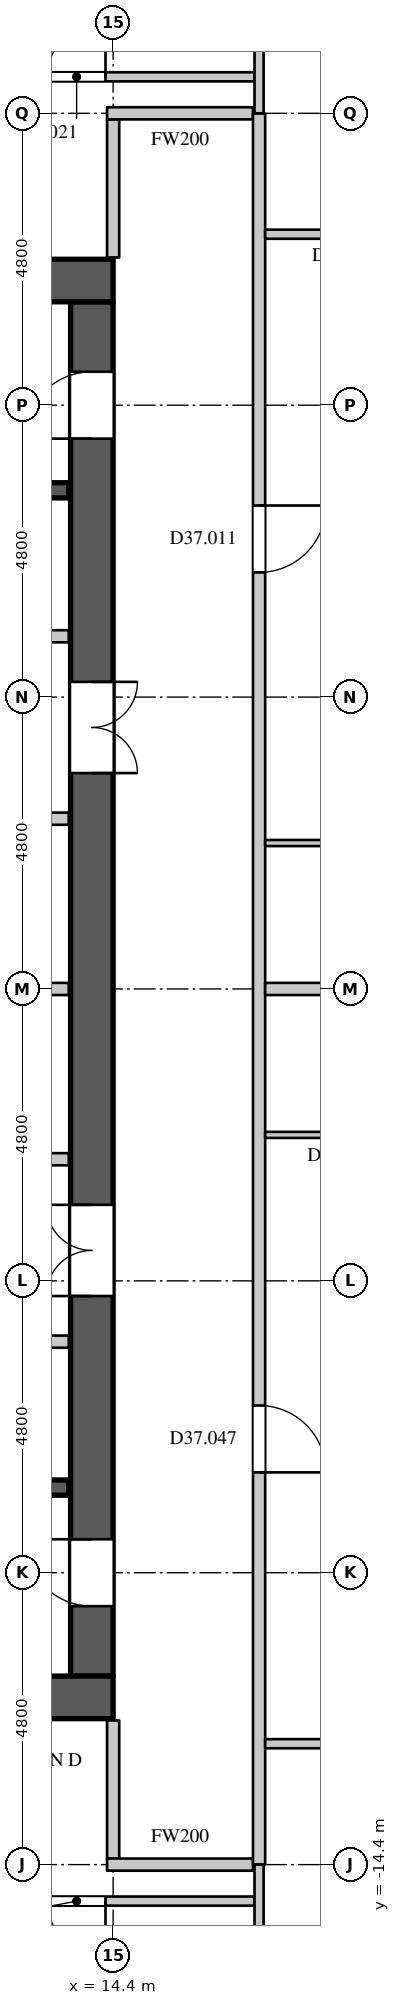
"""IFC4 building model, lengths in metres.
Left out: names, types, materials, properties, quantities, classifications, styles, units other than length and angle.
Written with IfcOpenShell. Run it as: python <this file> out.ifc"""

import sys

from ifc_helpers import new_model, si_unit, direction, frame, frame_2d, origin, place, context, subcontext, project, spatial, rectangle, extrude, element, fill, save


model = new_model("IFC4")
c1 = context("Model", 3, precision=1e-05, world=origin(), true_north=direction((0.0, 1.0)))
c2 = subcontext(c1, "Body", "Model", "MODEL_VIEW")
j1 = project(units=[si_unit("LENGTHUNIT", "METRE"), si_unit("PLANEANGLEUNIT", "RADIAN")], contexts=[c1])
p1 = place(None, origin())
s1 = spatial("IfcSite", under=j1, at=p1, CompositionType="ELEMENT")
p2 = place(p1, origin())
s2 = spatial("IfcBuilding", under=s1, at=p2, CompositionType="ELEMENT")
p3 = place(p2, frame((0.0, 0.0, 162.3)))
s3 = spatial("IfcBuildingStorey", under=s2, at=p3, CompositionType="ELEMENT", Elevation=162.3)
for number, where, z_axis, x_axis in (
    (1, (-14.4, 11.65, 0.0), (0.0, 0.0, 1.0), (1.0, 0.0, 0.0)),
    (2, (-14.4, -11.65, 0.0), (0.0, 0.0, 1.0), (1.0, 0.0, 0.0)),
):
    element("IfcWall", number, at=place(p3, frame(where, z_axis=z_axis, x_axis=x_axis)), inside=s3, PredefinedType="SHEAR", context=c2, shape_type="SweptSolid", body=[
        extrude(rectangle(XDim=28.8, YDim=0.7, at=frame_2d((14.4, 0.0))), origin(), (0.0, 0.0, 1.0), 4.2),
    ])
p4 = place(p3, frame((14.05, -11.3, 0.0), z_axis=(0.0, 0.0, 1.0), x_axis=(0.0, 1.0, 0.0)))
e3 = element("IfcWall", 3, at=p4, inside=s3, PredefinedType="SHEAR", context=c2, shape_type="SweptSolid", body=[
    extrude(rectangle(XDim=22.6, YDim=0.7, at=frame_2d((11.3, 0.0))), origin(), (0.0, 0.0, 1.0), 4.2),
])
p5 = place(p4, frame((20.35, 0.0, 0.0)))
e4 = element("IfcOpeningElement", 4, at=p5, cuts=e3, PredefinedType="OPENING", context=c2, shape_type="SweptSolid", body=[
    extrude(rectangle(XDim=1.1, YDim=2.2, at=frame_2d((0.55, 1.1))), frame((0.0, 0.36, 0.0), z_axis=(0.0, -1.0, 0.0), x_axis=(1.0, 0.0, 0.0)), (0.0, 0.0, 1.0), 0.72),
])
p6 = place(p4, frame((1.15, 0.0, 0.0)))
e5 = element("IfcOpeningElement", 5, at=p6, cuts=e3, PredefinedType="OPENING", context=c2, shape_type="SweptSolid", body=[
    extrude(rectangle(XDim=1.1, YDim=2.2, at=frame_2d((0.55, 1.1))), frame((0.0, 0.36, 0.0), z_axis=(0.0, -1.0, 0.0), x_axis=(1.0, 0.0, 0.0)), (0.0, 0.0, 1.0), 0.72),
])
p7 = place(p4, frame((14.85, 0.0, 0.0)))
e6 = element("IfcOpeningElement", 6, at=p7, cuts=e3, PredefinedType="OPENING", context=c2, shape_type="SweptSolid", body=[
    extrude(rectangle(XDim=1.5, YDim=2.4, at=frame_2d((0.75, 1.2))), frame((0.0, 0.36, 0.0), z_axis=(0.0, -1.0, 0.0), x_axis=(1.0, 0.0, 0.0)), (0.0, 0.0, 1.0), 0.72),
])
p8 = place(p4, frame((6.25, 0.0, 0.0)))
e7 = element("IfcOpeningElement", 7, at=p8, cuts=e3, PredefinedType="OPENING", context=c2, shape_type="SweptSolid", body=[
    extrude(rectangle(XDim=1.5, YDim=2.4, at=frame_2d((0.75, 1.2))), frame((0.0, 0.36, 0.0), z_axis=(0.0, -1.0, 0.0), x_axis=(1.0, 0.0, 0.0)), (0.0, 0.0, 1.0), 0.72),
])
p9 = place(p3, frame((-2.22, -5.8, 0.0), z_axis=(0.0, 0.0, 1.0), x_axis=(1.0, 0.0, 0.0)))
e8 = element("IfcWall", 8, at=p9, inside=s3, PredefinedType="PARTITIONING", context=c2, shape_type="SweptSolid", body=[
    extrude(rectangle(XDim=15.89, YDim=0.2, at=frame_2d((7.945, 0.0))), origin(), (0.0, 0.0, 1.0), 3.95),
])
p10 = place(p9, frame((3.15, 0.0, 0.0)))
e9 = element("IfcOpeningElement", 9, at=p10, cuts=e8, PredefinedType="OPENING", context=c2, shape_type="SweptSolid", body=[
    extrude(rectangle(XDim=0.9, YDim=2.2, at=frame_2d((0.45, 1.1))), frame((0.0, 0.11, 0.0), z_axis=(0.0, -1.0, 0.0), x_axis=(1.0, 0.0, 0.0)), (0.0, 0.0, 1.0), 0.22),
])
p11 = place(p9, frame((8.5, 0.0, 0.0)))
e10 = element("IfcOpeningElement", 10, at=p11, cuts=e8, PredefinedType="OPENING", context=c2, shape_type="SweptSolid", body=[
    extrude(rectangle(XDim=0.9, YDim=2.2, at=frame_2d((0.45, 1.1))), frame((0.0, 0.11, 0.0), z_axis=(0.0, -1.0, 0.0), x_axis=(1.0, 0.0, 0.0)), (0.0, 0.0, 1.0), 0.22),
])
p12 = place(p9, frame((12.8, 0.0, 0.0)))
e11 = element("IfcOpeningElement", 11, at=p12, cuts=e8, PredefinedType="OPENING", context=c2, shape_type="SweptSolid", body=[
    extrude(rectangle(XDim=0.9, YDim=2.2, at=frame_2d((0.45, 1.1))), frame((0.0, 0.11, 0.0), z_axis=(0.0, -1.0, 0.0), x_axis=(1.0, 0.0, 0.0)), (0.0, 0.0, 1.0), 0.22),
])
p13 = place(p3, frame((14.4, -14.3, 0.0), z_axis=(0.0, 0.0, 1.0), x_axis=(0.0, 1.0, 0.0)))
e12 = element("IfcWall", 12, at=p13, inside=s3, PredefinedType="PARTITIONING", context=c2, shape_type="SweptSolid", body=[
    extrude(rectangle(XDim=2.27, YDim=0.2, at=frame_2d((1.135, 0.0))), origin(), (0.0, 0.0, 1.0), 3.95),
])
p14 = place(p3, frame((14.3, -14.4, 0.0), z_axis=(0.0, 0.0, 1.0), x_axis=(1.0, 0.0, 0.0)))
e13 = element("IfcWall", 13, at=p14, inside=s3, PredefinedType="PARTITIONING", context=c2, shape_type="SweptSolid", body=[
    extrude(rectangle(XDim=2.4, YDim=0.2, at=frame_2d((1.2, 0.0))), origin(), (0.0, 0.0, 1.0), 3.95),
])
p15 = place(p3, frame((14.4, 12.03, 0.0), z_axis=(0.0, 0.0, 1.0), x_axis=(0.0, 1.0, 0.0)))
e14 = element("IfcWall", 14, at=p15, inside=s3, PredefinedType="PARTITIONING", context=c2, shape_type="SweptSolid", body=[
    extrude(rectangle(XDim=2.27, YDim=0.2, at=frame_2d((1.135, 0.0))), origin(), (0.0, 0.0, 1.0), 3.95),
])
p16 = place(p3, frame((14.3, 14.4, 0.0), z_axis=(0.0, 0.0, 1.0), x_axis=(1.0, 0.0, 0.0)))
e15 = element("IfcWall", 15, at=p16, inside=s3, PredefinedType="PARTITIONING", context=c2, shape_type="SweptSolid", body=[
    extrude(rectangle(XDim=2.4, YDim=0.2, at=frame_2d((1.2, 0.0))), origin(), (0.0, 0.0, 1.0), 3.95),
])
p17 = place(p3, frame((16.8, -14.4, 0.0), z_axis=(0.0, 0.0, 1.0), x_axis=(0.0, 1.0, 0.0)))
e16 = element("IfcWall", 16, at=p17, inside=s3, PredefinedType="PARTITIONING", context=c2, shape_type="SweptSolid", body=[
    extrude(rectangle(XDim=28.8, YDim=0.2, at=frame_2d((14.4, 0.0))), origin(), (0.0, 0.0, 1.0), 3.95),
])
p18 = place(p17, frame((21.25, 0.0, 0.0)))
e17 = element("IfcOpeningElement", 17, at=p18, cuts=e16, PredefinedType="OPENING", context=c2, shape_type="SweptSolid", body=[
    extrude(rectangle(XDim=1.1, YDim=2.4, at=frame_2d((0.55, 1.2))), frame((0.0, 0.11, 0.0), z_axis=(0.0, -1.0, 0.0), x_axis=(1.0, 0.0, 0.0)), (0.0, 0.0, 1.0), 0.22),
])
p19 = place(p17, frame((6.45, 0.0, 0.0)))
e18 = element("IfcOpeningElement", 18, at=p19, cuts=e16, PredefinedType="OPENING", context=c2, shape_type="SweptSolid", body=[
    extrude(rectangle(XDim=1.1, YDim=2.4, at=frame_2d((0.55, 1.2))), frame((0.0, 0.11, 0.0), z_axis=(0.0, -1.0, 0.0), x_axis=(1.0, 0.0, 0.0)), (0.0, 0.0, 1.0), 0.22),
])
p20 = place(p3, frame((11.675, -15.0, 0.0), z_axis=(0.0, 0.0, 1.0), x_axis=(1.0, 0.0, 0.0)))
e19 = element("IfcWall", 19, at=p20, inside=s3, PredefinedType="PARTITIONING", context=c2, shape_type="SweptSolid", body=[
    extrude(rectangle(XDim=5.051, YDim=0.15, at=frame_2d((2.525, 0.0))), origin(), (0.0, 0.0, 1.0), 3.95),
])
p21 = place(p20, frame((1.65, 0.0, 0.0)))
e20 = element("IfcOpeningElement", 20, at=p21, cuts=e19, PredefinedType="OPENING", context=c2, shape_type="SweptSolid", body=[
    extrude(rectangle(XDim=0.95, YDim=2.2, at=frame_2d((0.475, 1.1))), frame((0.0, 0.085, 0.0), z_axis=(0.0, -1.0, 0.0), x_axis=(1.0, 0.0, 0.0)), (0.0, 0.0, 1.0), 0.17),
])
p22 = place(p3, frame((11.675, 15.0, 0.0), z_axis=(0.0, 0.0, 1.0), x_axis=(1.0, 0.0, 0.0)))
e21 = element("IfcWall", 21, at=p22, inside=s3, PredefinedType="PARTITIONING", context=c2, shape_type="SweptSolid", body=[
    extrude(rectangle(XDim=5.051, YDim=0.15, at=frame_2d((2.525, 0.0))), origin(), (0.0, 0.0, 1.0), 3.95),
])
p23 = place(p22, frame((1.65, 0.0, 0.0)))
e22 = element("IfcOpeningElement", 22, at=p23, cuts=e21, PredefinedType="OPENING", context=c2, shape_type="SweptSolid", body=[
    extrude(rectangle(XDim=0.95, YDim=2.2, at=frame_2d((0.475, 1.1))), frame((0.0, 0.085, 0.0), z_axis=(0.0, -1.0, 0.0), x_axis=(1.0, 0.0, 0.0)), (0.0, 0.0, 1.0), 0.17),
])
p24 = place(p3, frame((16.8, -18.131, 0.0), z_axis=(0.0, 0.0, 1.0), x_axis=(0.0, 1.0, 0.0)))
e23 = element("IfcWall", 23, at=p24, inside=s3, PredefinedType="PARTITIONING", context=c2, shape_type="SweptSolid", body=[
    extrude(rectangle(XDim=3.731, YDim=0.15, at=frame_2d((1.865, 0.0))), origin(), (0.0, 0.0, 1.0), 3.95),
])
p25 = place(p24, frame((1.15, 0.0, 0.0)))
e24 = element("IfcOpeningElement", 24, at=p25, cuts=e23, PredefinedType="OPENING", context=c2, shape_type="SweptSolid", body=[
    extrude(rectangle(XDim=0.95, YDim=2.2, at=frame_2d((0.475, 1.1))), frame((0.0, 0.085, 0.0), z_axis=(0.0, -1.0, 0.0), x_axis=(1.0, 0.0, 0.0)), (0.0, 0.0, 1.0), 0.17),
])
p26 = place(p3, frame((16.9, -12.412, 0.0), z_axis=(0.0, 0.0, 1.0), x_axis=(1.0, 0.0, 0.0)))
e25 = element("IfcWall", 25, at=p26, inside=s3, PredefinedType="PARTITIONING", context=c2, shape_type="SweptSolid", body=[
    extrude(rectangle(XDim=5.638, YDim=0.15, at=frame_2d((2.819, 0.0))), origin(), (0.0, 0.0, 1.0), 3.95),
])
p27 = place(p26, frame((1.2, 0.0, 0.0)))
e26 = element("IfcOpeningElement", 26, at=p27, cuts=e25, PredefinedType="OPENING", context=c2, shape_type="SweptSolid", body=[
    extrude(rectangle(XDim=0.95, YDim=2.2, at=frame_2d((0.475, 1.1))), frame((0.0, 0.085, 0.0), z_axis=(0.0, -1.0, 0.0), x_axis=(1.0, 0.0, 0.0)), (0.0, 0.0, 1.0), 0.17),
])
p28 = place(p3, frame((16.9, 12.412, 0.0), z_axis=(0.0, 0.0, 1.0), x_axis=(1.0, 0.0, 0.0)))
e27 = element("IfcWall", 27, at=p28, inside=s3, PredefinedType="PARTITIONING", context=c2, shape_type="SweptSolid", body=[
    extrude(rectangle(XDim=5.638, YDim=0.15, at=frame_2d((2.819, 0.0))), origin(), (0.0, 0.0, 1.0), 3.95),
])
p29 = place(p28, frame((1.2, 0.0, 0.0)))
e28 = element("IfcOpeningElement", 28, at=p29, cuts=e27, PredefinedType="OPENING", context=c2, shape_type="SweptSolid", body=[
    extrude(rectangle(XDim=0.95, YDim=2.2, at=frame_2d((0.475, 1.1))), frame((0.0, 0.085, 0.0), z_axis=(0.0, -1.0, 0.0), x_axis=(1.0, 0.0, 0.0)), (0.0, 0.0, 1.0), 0.17),
])
p30 = place(p3, frame((16.8, 14.4, 0.0), z_axis=(0.0, 0.0, 1.0), x_axis=(0.0, 1.0, 0.0)))
e29 = element("IfcWall", 29, at=p30, inside=s3, PredefinedType="PARTITIONING", context=c2, shape_type="SweptSolid", body=[
    extrude(rectangle(XDim=3.731, YDim=0.15, at=frame_2d((1.865, 0.0))), origin(), (0.0, 0.0, 1.0), 3.95),
])
p31 = place(p30, frame((1.6, 0.0, 0.0)))
e30 = element("IfcOpeningElement", 30, at=p31, cuts=e29, PredefinedType="OPENING", context=c2, shape_type="SweptSolid", body=[
    extrude(rectangle(XDim=0.95, YDim=2.2, at=frame_2d((0.475, 1.1))), frame((0.0, 0.085, 0.0), z_axis=(0.0, -1.0, 0.0), x_axis=(1.0, 0.0, 0.0)), (0.0, 0.0, 1.0), 0.17),
])
p32 = place(p3, frame((16.9, 0.0, 0.0), z_axis=(0.0, 0.0, 1.0), x_axis=(1.0, 0.0, 0.0)))
e31 = element("IfcWall", 31, at=p32, inside=s3, PredefinedType="PARTITIONING", context=c2, shape_type="SweptSolid", body=[
    extrude(rectangle(XDim=7.155, YDim=0.2, at=frame_2d((3.578, 0.0))), origin(), (0.0, 0.0, 1.0), 3.95),
])
p33 = place(p3, frame((7.8, -2.8, 0.0), z_axis=(0.0, 0.0, 1.0), x_axis=(1.0, 0.0, 0.0)))
e32 = element("IfcWall", 32, at=p33, inside=s3, PredefinedType="PARTITIONING", context=c2, shape_type="SweptSolid", body=[
    extrude(rectangle(XDim=5.87, YDim=0.2, at=frame_2d((2.935, 0.0))), origin(), (0.0, 0.0, 1.0), 3.95),
])
p34 = place(p33, frame((2.5, 0.0, 0.0)))
e33 = element("IfcOpeningElement", 33, at=p34, cuts=e32, PredefinedType="OPENING", context=c2, shape_type="SweptSolid", body=[
    extrude(rectangle(XDim=0.9, YDim=2.2, at=frame_2d((0.45, 1.1))), frame((0.0, 0.11, 0.0), z_axis=(0.0, -1.0, 0.0), x_axis=(1.0, 0.0, 0.0)), (0.0, 0.0, 1.0), 0.22),
])
p35 = place(p3, frame((7.8, 0.0, 0.0), z_axis=(0.0, 0.0, 1.0), x_axis=(1.0, 0.0, 0.0)))
e34 = element("IfcWall", 34, at=p35, inside=s3, PredefinedType="PARTITIONING", context=c2, shape_type="SweptSolid", body=[
    extrude(rectangle(XDim=5.87, YDim=0.2, at=frame_2d((2.935, 0.0))), origin(), (0.0, 0.0, 1.0), 3.95),
])
p36 = place(p3, frame((8.82, 5.8, 0.0), z_axis=(0.0, 0.0, 1.0), x_axis=(1.0, 0.0, 0.0)))
e35 = element("IfcWall", 35, at=p36, inside=s3, PredefinedType="PARTITIONING", context=c2, shape_type="SweptSolid", body=[
    extrude(rectangle(XDim=4.85, YDim=0.2, at=frame_2d((2.425, 0.0))), origin(), (0.0, 0.0, 1.0), 3.95),
])
p37 = place(p36, frame((2.0, 0.0, 0.0)))
e36 = element("IfcOpeningElement", 36, at=p37, cuts=e35, PredefinedType="OPENING", context=c2, shape_type="SweptSolid", body=[
    extrude(rectangle(XDim=0.9, YDim=2.2, at=frame_2d((0.45, 1.1))), frame((0.0, 0.11, 0.0), z_axis=(0.0, -1.0, 0.0), x_axis=(1.0, 0.0, 0.0)), (0.0, 0.0, 1.0), 0.22),
])
p38 = place(p3, frame((10.42, 2.8, 0.0), z_axis=(0.0, 0.0, 1.0), x_axis=(1.0, 0.0, 0.0)))
e37 = element("IfcWall", 37, at=p38, inside=s3, PredefinedType="PARTITIONING", context=c2, shape_type="SweptSolid", body=[
    extrude(rectangle(XDim=3.25, YDim=0.2, at=frame_2d((1.625, 0.0))), origin(), (0.0, 0.0, 1.0), 3.95),
])
p39 = place(p38, frame((1.3, 0.0, 0.0)))
e38 = element("IfcOpeningElement", 38, at=p39, cuts=e37, PredefinedType="OPENING", context=c2, shape_type="SweptSolid", body=[
    extrude(rectangle(XDim=0.6, YDim=2.0, at=frame_2d((0.3, 1.0))), frame((0.0, 0.11, 0.0), z_axis=(0.0, -1.0, 0.0), x_axis=(1.0, 0.0, 0.0)), (0.0, 0.0, 1.0), 0.22),
])
p40 = place(p3, frame((5.275, -8.2, 0.0), z_axis=(0.0, 0.0, 1.0), x_axis=(1.0, 0.0, 0.0)))
e39 = element("IfcWall", 39, at=p40, inside=s3, PredefinedType="SHEAR", context=c2, shape_type="SweptSolid", body=[
    extrude(rectangle(XDim=8.395, YDim=0.25, at=frame_2d((4.198, 0.0))), origin(), (0.0, 0.0, 1.0), 3.95),
])
p41 = place(p3, frame((5.525, 8.2, 0.0), z_axis=(0.0, 0.0, 1.0), x_axis=(1.0, 0.0, 0.0)))
e40 = element("IfcWall", 40, at=p41, inside=s3, PredefinedType="SHEAR", context=c2, shape_type="SweptSolid", body=[
    extrude(rectangle(XDim=8.145, YDim=0.25, at=frame_2d((4.073, 0.0))), origin(), (0.0, 0.0, 1.0), 3.95),
])
p42 = place(p3, frame((16.9, -2.4, 0.0), z_axis=(0.0, 0.0, 1.0), x_axis=(1.0, 0.0, 0.0)))
e41 = element("IfcWall", 41, at=p42, inside=s3, PredefinedType="PARTITIONING", context=c2, shape_type="SweptSolid", body=[
    extrude(rectangle(XDim=3.225, YDim=0.1, at=frame_2d((1.613, 0.0))), origin(), (0.0, 0.0, 1.0), 3.95),
])
p43 = place(p42, frame((1.15, 0.0, 0.0)))
e42 = element("IfcOpeningElement", 42, at=p43, cuts=e41, PredefinedType="OPENING", context=c2, shape_type="SweptSolid", body=[
    extrude(rectangle(XDim=0.9, YDim=2.2, at=frame_2d((0.45, 1.1))), frame((0.0, 0.06, 0.0), z_axis=(0.0, -1.0, 0.0), x_axis=(1.0, 0.0, 0.0)), (0.0, 0.0, 1.0), 0.12),
])
p44 = place(p3, frame((16.9, 2.4, 0.0), z_axis=(0.0, 0.0, 1.0), x_axis=(1.0, 0.0, 0.0)))
e43 = element("IfcWall", 43, at=p44, inside=s3, PredefinedType="PARTITIONING", context=c2, shape_type="SweptSolid", body=[
    extrude(rectangle(XDim=3.225, YDim=0.1, at=frame_2d((1.613, 0.0))), origin(), (0.0, 0.0, 1.0), 3.95),
])
p45 = place(p44, frame((1.15, 0.0, 0.0)))
e44 = element("IfcOpeningElement", 44, at=p45, cuts=e43, PredefinedType="OPENING", context=c2, shape_type="SweptSolid", body=[
    extrude(rectangle(XDim=0.9, YDim=2.2, at=frame_2d((0.45, 1.1))), frame((0.0, 0.06, 0.0), z_axis=(0.0, -1.0, 0.0), x_axis=(1.0, 0.0, 0.0)), (0.0, 0.0, 1.0), 0.12),
])
p46 = place(p5, origin())
e45 = element("IfcDoor", 45, at=p46, inside=s3, OperationType="SINGLE_SWING_LEFT", PredefinedType="DOOR", context=c2, shape_type="SweptSolid", body=[
    extrude(rectangle(XDim=1.1, YDim=2.2, at=frame_2d((0.55, 1.1))), frame((0.0, 0.345, 0.0), z_axis=(0.0, -1.0, 0.0), x_axis=(1.0, 0.0, 0.0)), (0.0, 0.0, 1.0), 0.05),
])
fill(e4, e45)
p47 = place(p6, origin())
e46 = element("IfcDoor", 46, at=p47, inside=s3, OperationType="SINGLE_SWING_RIGHT", PredefinedType="DOOR", context=c2, shape_type="SweptSolid", body=[
    extrude(rectangle(XDim=1.1, YDim=2.2, at=frame_2d((0.55, 1.1))), frame((0.0, 0.345, 0.0), z_axis=(0.0, -1.0, 0.0), x_axis=(1.0, 0.0, 0.0)), (0.0, 0.0, 1.0), 0.05),
])
fill(e5, e46)
p48 = place(p7, origin())
e47 = element("IfcDoor", 47, at=p48, inside=s3, OperationType="DOUBLE_DOOR_SINGLE_SWING", PredefinedType="DOOR", context=c2, shape_type="SweptSolid", body=[
    extrude(rectangle(XDim=1.5, YDim=2.4, at=frame_2d((0.75, 1.2))), frame((0.0, -0.295, 0.0), z_axis=(0.0, -1.0, 0.0), x_axis=(1.0, 0.0, 0.0)), (0.0, 0.0, 1.0), 0.05),
])
fill(e6, e47)
p49 = place(p8, origin())
e48 = element("IfcDoor", 48, at=p49, inside=s3, OperationType="DOUBLE_DOOR_SINGLE_SWING", PredefinedType="DOOR", context=c2, shape_type="SweptSolid", body=[
    extrude(rectangle(XDim=1.5, YDim=2.4, at=frame_2d((0.75, 1.2))), frame((0.0, 0.345, 0.0), z_axis=(0.0, -1.0, 0.0), x_axis=(1.0, 0.0, 0.0)), (0.0, 0.0, 1.0), 0.05),
])
fill(e7, e48)
p50 = place(p18, origin())
e49 = element("IfcDoor", 49, at=p50, inside=s3, OperationType="SINGLE_SWING_LEFT", PredefinedType="DOOR", context=c2, shape_type="SweptSolid", body=[
    extrude(rectangle(XDim=1.1, YDim=2.4, at=frame_2d((0.55, 1.2))), frame((0.0, 0.025, 0.0), z_axis=(0.0, -1.0, 0.0), x_axis=(1.0, 0.0, 0.0)), (0.0, 0.0, 1.0), 0.05),
])
fill(e17, e49)
p51 = place(p23, origin())
e50 = element("IfcDoor", 50, at=p51, inside=s3, OperationType="SINGLE_SWING_RIGHT", PredefinedType="DOOR", context=c2, shape_type="SweptSolid", body=[
    extrude(rectangle(XDim=0.95, YDim=2.2, at=frame_2d((0.475, 1.1))), frame((0.0, 0.025, 0.0), z_axis=(0.0, -1.0, 0.0), x_axis=(1.0, 0.0, 0.0)), (0.0, 0.0, 1.0), 0.05),
])
fill(e22, e50)
p52 = place(p19, origin())
e51 = element("IfcDoor", 51, at=p52, inside=s3, OperationType="SINGLE_SWING_RIGHT", PredefinedType="DOOR", context=c2, shape_type="SweptSolid", body=[
    extrude(rectangle(XDim=1.1, YDim=2.4, at=frame_2d((0.55, 1.2))), frame((0.0, 0.025, 0.0), z_axis=(0.0, -1.0, 0.0), x_axis=(1.0, 0.0, 0.0)), (0.0, 0.0, 1.0), 0.05),
])
fill(e18, e51)
p53 = place(p21, origin())
e52 = element("IfcDoor", 52, at=p53, inside=s3, OperationType="SINGLE_SWING_LEFT", PredefinedType="DOOR", context=c2, shape_type="SweptSolid", body=[
    extrude(rectangle(XDim=0.95, YDim=2.2, at=frame_2d((0.475, 1.1))), frame((0.0, 0.025, 0.0), z_axis=(0.0, -1.0, 0.0), x_axis=(1.0, 0.0, 0.0)), (0.0, 0.0, 1.0), 0.05),
])
fill(e20, e52)
save(model, sys.argv[1])
